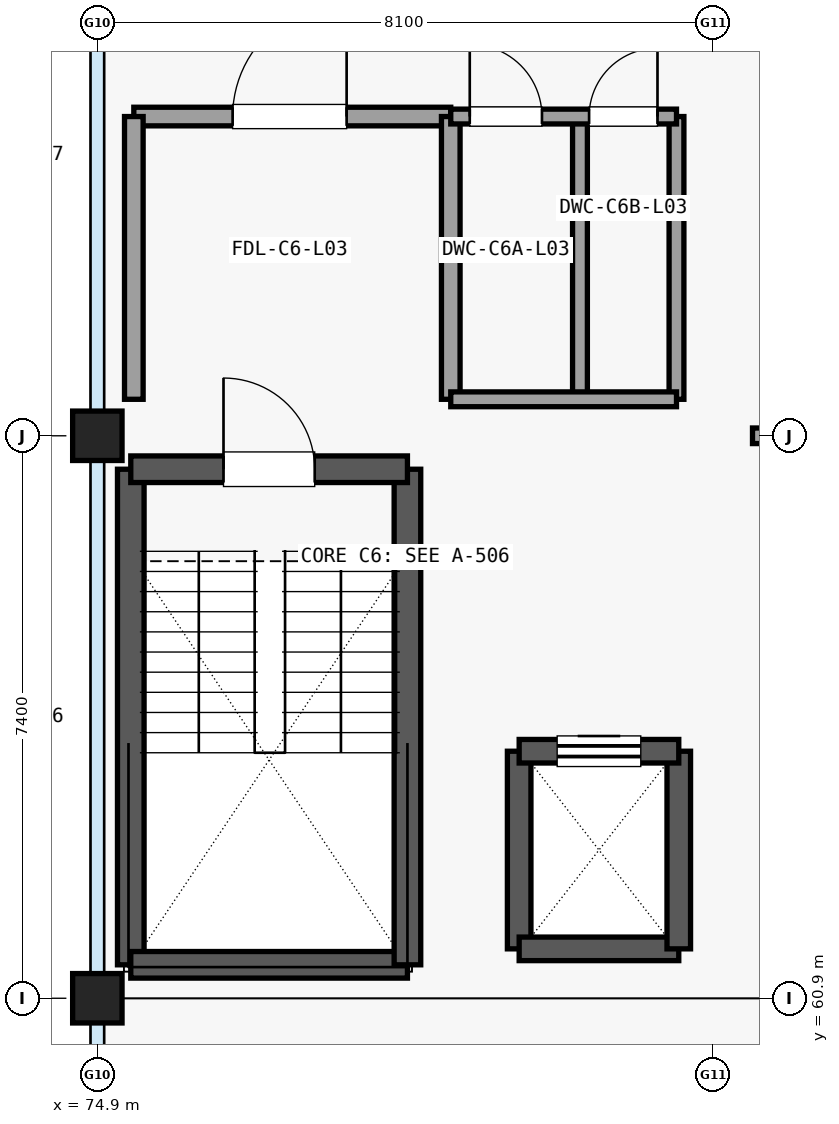
"""IFC4 building model, lengths in metres.
Left out: names, types, materials, properties, quantities, classifications, styles, units other than length and angle.
Written with IfcOpenShell. Run it as: python <this file> out.ifc"""

import sys

from ifc_helpers import new_model, si_unit, direction, frame, frame_2d, origin, origin_2d, place, context, subcontext, project, spatial, rectangle, extrude, element, fill, save


model = new_model("IFC4")
c1 = context("Model", 3, precision=1e-05, world=origin(), true_north=direction((0.0, 1.0)))
c2 = subcontext(c1, "Body", "Model", "MODEL_VIEW")
j1 = project(units=[si_unit("LENGTHUNIT", "METRE"), si_unit("PLANEANGLEUNIT", "RADIAN")], contexts=[c1])
p1 = place(None, origin())
s1 = spatial("IfcSite", under=j1, at=p1, CompositionType="ELEMENT")
p2 = place(p1, origin())
s2 = spatial("IfcBuilding", under=s1, at=p2, CompositionType="ELEMENT")
p3 = place(p2, frame((0.0, 0.0, 13.8)))
s3 = spatial("IfcBuildingStorey", under=s2, at=p3, CompositionType="ELEMENT", Elevation=13.8)
for number, where, z_axis, x_axis in (
    (1, (74.9, 60.9, 0.0), (0.0, 0.0, 1.0), (1.0, 0.0, 0.0)),
    (2, (74.9, 68.3, 0.0), (0.0, 0.0, 1.0), (1.0, 0.0, 0.0)),
):
    element("IfcColumn", number, at=place(p3, frame(where, z_axis=z_axis, x_axis=x_axis)), inside=s3, PredefinedType="COLUMN", context=c2, shape_type="SweptSolid", body=[
        extrude(rectangle(XDim=0.65, YDim=0.65, at=origin_2d()), origin(), (0.0, 0.0, 1.0), 3.38),
    ])
p4 = place(p3, frame((75.34, 61.34, 0.0), z_axis=(0.0, 0.0, 1.0), x_axis=(0.0, 1.0, 0.0)))
e3 = element("IfcWall", 3, at=p4, inside=s3, PredefinedType="SHEAR", context=c2, shape_type="SweptSolid", body=[
    extrude(rectangle(XDim=6.52, YDim=0.35, at=frame_2d((3.26, 0.0))), origin(), (0.0, 0.0, 1.0), 3.375),
])
p5 = place(p3, frame((75.34, 61.34, 0.0), z_axis=(0.0, 0.0, 1.0), x_axis=(1.0, 0.0, 0.0)))
e4 = element("IfcWall", 4, at=p5, inside=s3, PredefinedType="SHEAR", context=c2, shape_type="SweptSolid", body=[
    extrude(rectangle(XDim=3.64, YDim=0.35, at=frame_2d((1.82, 0.0))), origin(), (0.0, 0.0, 1.0), 3.375),
])
p6 = place(p3, frame((78.98, 61.34, 0.0), z_axis=(0.0, 0.0, 1.0), x_axis=(0.0, 1.0, 0.0)))
e5 = element("IfcWall", 5, at=p6, inside=s3, PredefinedType="SHEAR", context=c2, shape_type="SweptSolid", body=[
    extrude(rectangle(XDim=6.52, YDim=0.35, at=frame_2d((3.26, 0.0))), origin(), (0.0, 0.0, 1.0), 3.375),
])
p7 = place(p3, frame((75.34, 67.86, 0.0), z_axis=(0.0, 0.0, 1.0), x_axis=(1.0, 0.0, 0.0)))
e6 = element("IfcWall", 6, at=p7, inside=s3, PredefinedType="SHEAR", context=c2, shape_type="SweptSolid", body=[
    extrude(rectangle(XDim=3.64, YDim=0.35, at=frame_2d((1.82, 0.0))), origin(), (0.0, 0.0, 1.0), 3.375),
])
p8 = place(p7, frame((1.22, 0.0, 0.0)))
e7 = element("IfcOpeningElement", 7, at=p8, cuts=e6, PredefinedType="OPENING", context=c2, shape_type="SweptSolid", body=[
    extrude(rectangle(XDim=1.2, YDim=2.15, at=frame_2d((0.6, 1.075))), frame((0.0, 0.185, 0.0), z_axis=(0.0, -1.0, 0.0), x_axis=(1.0, 0.0, 0.0)), (0.0, 0.0, 1.0), 0.37),
])
p9 = place(p3, frame((80.45, 61.55, 0.0), z_axis=(0.0, 0.0, 1.0), x_axis=(0.0, 1.0, 0.0)))
e8 = element("IfcWall", 8, at=p9, inside=s3, PredefinedType="SHEAR", context=c2, shape_type="SweptSolid", body=[
    extrude(rectangle(XDim=2.6, YDim=0.31, at=frame_2d((1.3, 0.0))), origin(), (0.0, 0.0, 1.0), 3.375),
])
p10 = place(p3, frame((80.45, 61.55, 0.0), z_axis=(0.0, 0.0, 1.0), x_axis=(1.0, 0.0, 0.0)))
e9 = element("IfcWall", 9, at=p10, inside=s3, PredefinedType="SHEAR", context=c2, shape_type="SweptSolid", body=[
    extrude(rectangle(XDim=2.1, YDim=0.31, at=frame_2d((1.05, 0.0))), origin(), (0.0, 0.0, 1.0), 3.375),
])
p11 = place(p3, frame((82.55, 61.55, 0.0), z_axis=(0.0, 0.0, 1.0), x_axis=(0.0, 1.0, 0.0)))
e10 = element("IfcWall", 10, at=p11, inside=s3, PredefinedType="SHEAR", context=c2, shape_type="SweptSolid", body=[
    extrude(rectangle(XDim=2.6, YDim=0.31, at=frame_2d((1.3, 0.0))), origin(), (0.0, 0.0, 1.0), 3.375),
])
p12 = place(p3, frame((80.45, 64.15, 0.0), z_axis=(0.0, 0.0, 1.0), x_axis=(1.0, 0.0, 0.0)))
e11 = element("IfcWall", 11, at=p12, inside=s3, PredefinedType="SHEAR", context=c2, shape_type="SweptSolid", body=[
    extrude(rectangle(XDim=2.1, YDim=0.31, at=frame_2d((1.05, 0.0))), origin(), (0.0, 0.0, 1.0), 3.375),
])
p13 = place(p12, frame((0.5, 0.0, 0.0)))
e12 = element("IfcOpeningElement", 12, at=p13, cuts=e11, PredefinedType="OPENING", context=c2, shape_type="SweptSolid", body=[
    extrude(rectangle(XDim=1.1, YDim=2.15, at=frame_2d((0.55, 1.075))), frame((0.0, 0.165, 0.0), z_axis=(0.0, -1.0, 0.0), x_axis=(1.0, 0.0, 0.0)), (0.0, 0.0, 1.0), 0.33),
])
p14 = place(p3, frame((75.38, 72.5, 0.0), z_axis=(0.0, 0.0, 1.0), x_axis=(1.0, 0.0, 0.0)))
e13 = element("IfcWall", 13, at=p14, inside=s3, PredefinedType="PARTITIONING", context=c2, shape_type="SweptSolid", body=[
    extrude(rectangle(XDim=4.17, YDim=0.245, at=frame_2d((2.085, 0.0))), origin(), (0.0, 0.0, 1.0), 2.608),
])
p15 = place(p14, frame((1.3, 0.0, 0.0)))
e14 = element("IfcOpeningElement", 14, at=p15, cuts=e13, PredefinedType="OPENING", context=c2, shape_type="SweptSolid", body=[
    extrude(rectangle(XDim=1.5, YDim=2.15, at=frame_2d((0.75, 1.075))), frame((0.0, 0.133, 0.0), z_axis=(0.0, -1.0, 0.0), x_axis=(1.0, 0.0, 0.0)), (0.0, 0.0, 1.0), 0.265),
])
for number, where, z_axis, x_axis in (
    (15, (75.38, 68.78, 0.0), (0.0, 0.0, 1.0), (0.0, 1.0, 0.0)),
    (16, (79.55, 68.78, 0.0), (0.0, 0.0, 1.0), (0.0, 1.0, 0.0)),
):
    element("IfcWall", number, at=place(p3, frame(where, z_axis=z_axis, x_axis=x_axis)), inside=s3, PredefinedType="PARTITIONING", context=c2, shape_type="SweptSolid", body=[
        extrude(rectangle(XDim=3.72, YDim=0.245, at=frame_2d((1.86, 0.0))), origin(), (0.0, 0.0, 1.0), 2.608),
    ])
for number, where, z_axis, x_axis in (
    (17, (81.25, 68.78, 0.0), (0.0, 0.0, 1.0), (0.0, 1.0, 0.0)),
    (18, (82.52, 68.78, 0.0), (0.0, 0.0, 1.0), (0.0, 1.0, 0.0)),
):
    element("IfcWall", number, at=place(p3, frame(where, z_axis=z_axis, x_axis=x_axis)), inside=s3, PredefinedType="PARTITIONING", context=c2, shape_type="SweptSolid", body=[
        extrude(rectangle(XDim=3.72, YDim=0.195, at=frame_2d((1.86, 0.0))), origin(), (0.0, 0.0, 1.0), 2.608),
    ])
p16 = place(p3, frame((79.55, 68.78, 0.0), z_axis=(0.0, 0.0, 1.0), x_axis=(1.0, 0.0, 0.0)))
e19 = element("IfcWall", 19, at=p16, inside=s3, PredefinedType="PARTITIONING", context=c2, shape_type="SweptSolid", body=[
    extrude(rectangle(XDim=2.97, YDim=0.195, at=frame_2d((1.485, 0.0))), origin(), (0.0, 0.0, 1.0), 2.608),
])
p17 = place(p3, frame((79.55, 72.5, 0.0), z_axis=(0.0, 0.0, 1.0), x_axis=(1.0, 0.0, 0.0)))
e20 = element("IfcWall", 20, at=p17, inside=s3, PredefinedType="PARTITIONING", context=c2, shape_type="SweptSolid", body=[
    extrude(rectangle(XDim=2.97, YDim=0.195, at=frame_2d((1.485, 0.0))), origin(), (0.0, 0.0, 1.0), 2.608),
])
p18 = place(p17, frame((0.25, 0.0, 0.0)))
e21 = element("IfcOpeningElement", 21, at=p18, cuts=e20, PredefinedType="OPENING", context=c2, shape_type="SweptSolid", body=[
    extrude(rectangle(XDim=0.95, YDim=2.1, at=frame_2d((0.475, 1.05))), frame((0.0, 0.107, 0.0), z_axis=(0.0, -1.0, 0.0), x_axis=(1.0, 0.0, 0.0)), (0.0, 0.0, 1.0), 0.215),
])
p19 = place(p17, frame((1.82, 0.0, 0.0)))
e22 = element("IfcOpeningElement", 22, at=p19, cuts=e20, PredefinedType="OPENING", context=c2, shape_type="SweptSolid", body=[
    extrude(rectangle(XDim=0.9, YDim=2.1, at=frame_2d((0.45, 1.05))), frame((0.0, 0.107, 0.0), z_axis=(0.0, -1.0, 0.0), x_axis=(1.0, 0.0, 0.0)), (0.0, 0.0, 1.0), 0.215),
])
p20 = place(p3, frame((83.52, 68.3, 0.0), z_axis=(0.0, 0.0, 1.0), x_axis=(1.0, 0.0, 0.0)))
e23 = element("IfcWall", 23, at=p20, inside=s3, PredefinedType="PARTITIONING", context=c2, shape_type="SweptSolid", body=[
    extrude(rectangle(XDim=7.06, YDim=0.205, at=frame_2d((3.53, 0.0))), origin(), (0.0, 0.0, 1.0), 2.608),
])
p21 = place(p20, frame((2.755, 0.0, 0.0)))
e24 = element("IfcOpeningElement", 24, at=p21, cuts=e23, PredefinedType="OPENING", context=c2, shape_type="SweptSolid", body=[
    extrude(rectangle(XDim=1.55, YDim=2.2, at=frame_2d((0.775, 1.1))), frame((0.0, 0.113, 0.0), z_axis=(0.0, -1.0, 0.0), x_axis=(1.0, 0.0, 0.0)), (0.0, 0.0, 1.0), 0.225),
])
p22 = place(p8, origin())
e25 = element("IfcDoor", 25, at=p22, inside=s3, OperationType="SINGLE_SWING_LEFT", PredefinedType="DOOR", context=c2, shape_type="SweptSolid", body=[
    extrude(rectangle(XDim=1.2, YDim=2.15, at=frame_2d((0.6, 1.075))), frame((0.0, 0.025, 0.0), z_axis=(0.0, -1.0, 0.0), x_axis=(1.0, 0.0, 0.0)), (0.0, 0.0, 1.0), 0.05),
])
fill(e7, e25)
p23 = place(p13, origin())
e26 = element("IfcDoor", 26, at=p23, inside=s3, OperationType="SLIDING_TO_LEFT", PredefinedType="DOOR", context=c2, shape_type="SweptSolid", body=[
    extrude(rectangle(XDim=1.1, YDim=2.15, at=frame_2d((0.55, 1.075))), frame((0.0, 0.025, 0.0), z_axis=(0.0, -1.0, 0.0), x_axis=(1.0, 0.0, 0.0)), (0.0, 0.0, 1.0), 0.05),
])
fill(e12, e26)
p24 = place(p15, origin())
e27 = element("IfcDoor", 27, at=p24, inside=s3, OperationType="SINGLE_SWING_RIGHT", PredefinedType="DOOR", context=c2, shape_type="SweptSolid", body=[
    extrude(rectangle(XDim=1.5, YDim=2.15, at=frame_2d((0.75, 1.075))), frame((0.0, 0.025, 0.0), z_axis=(0.0, -1.0, 0.0), x_axis=(1.0, 0.0, 0.0)), (0.0, 0.0, 1.0), 0.05),
])
fill(e14, e27)
p25 = place(p18, origin())
e28 = element("IfcDoor", 28, at=p25, inside=s3, OperationType="SINGLE_SWING_LEFT", PredefinedType="DOOR", context=c2, shape_type="SweptSolid", body=[
    extrude(rectangle(XDim=0.95, YDim=2.1, at=frame_2d((0.475, 1.05))), frame((0.0, 0.025, 0.0), z_axis=(0.0, -1.0, 0.0), x_axis=(1.0, 0.0, 0.0)), (0.0, 0.0, 1.0), 0.05),
])
fill(e21, e28)
p26 = place(p19, origin())
e29 = element("IfcDoor", 29, at=p26, inside=s3, OperationType="SINGLE_SWING_RIGHT", PredefinedType="DOOR", context=c2, shape_type="SweptSolid", body=[
    extrude(rectangle(XDim=0.9, YDim=2.1, at=frame_2d((0.45, 1.05))), frame((0.0, 0.025, 0.0), z_axis=(0.0, -1.0, 0.0), x_axis=(1.0, 0.0, 0.0)), (0.0, 0.0, 1.0), 0.05),
])
fill(e22, e29)
save(model, sys.argv[1])
